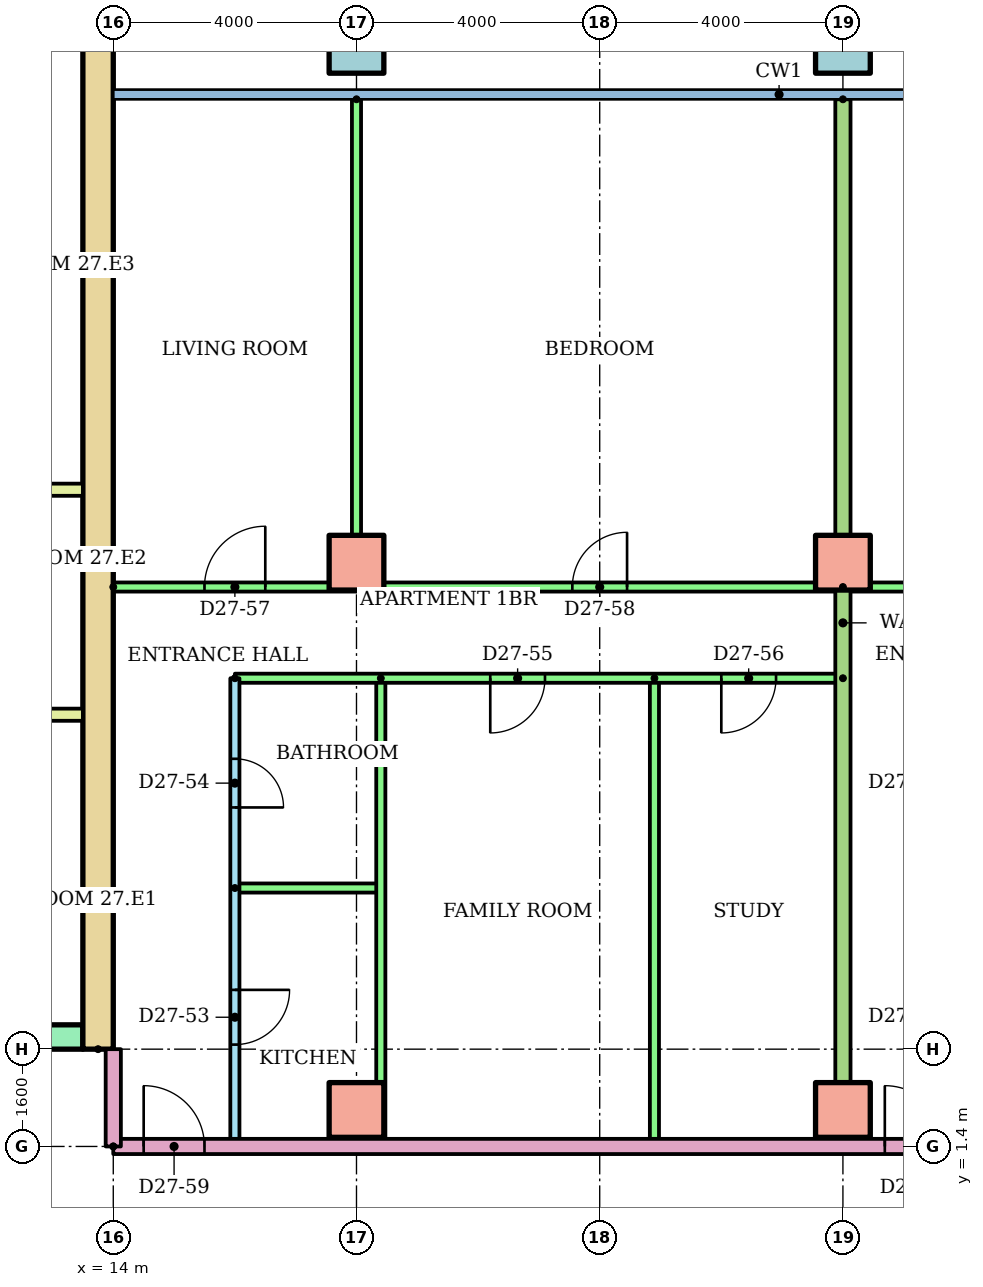
"""IFC4 building model, lengths in metres.
Left out: names, types, materials, properties, quantities, classifications, styles, units other than length and angle.
Written with IfcOpenShell. Run it as: python <this file> out.ifc"""

import sys

from ifc_helpers import new_model, si_unit, direction, frame, frame_2d, origin, origin_2d, place, context, subcontext, project, spatial, rectangle, hollow_rectangle, extrude, element, fill, save


model = new_model("IFC4")
c1 = context("Model", 3, precision=1e-05, world=origin(), true_north=direction((0.0, 1.0)))
c2 = subcontext(c1, "Body", "Model", "MODEL_VIEW")
j1 = project(units=[si_unit("LENGTHUNIT", "METRE"), si_unit("PLANEANGLEUNIT", "RADIAN")], contexts=[c1])
p1 = place(None, origin())
s1 = spatial("IfcSite", under=j1, at=p1, CompositionType="ELEMENT")
p2 = place(p1, origin())
s2 = spatial("IfcBuilding", under=s1, at=p2, CompositionType="ELEMENT")
p3 = place(p2, frame((0.0, 0.0, 103.1)))
s3 = spatial("IfcBuildingStorey", under=s2, at=p3, CompositionType="ELEMENT", Elevation=103.1)
for number, where in (
    (1, (18.0, 2.0, 0.0)),
    (2, (26.0, 2.0, 0.0)),
    (3, (18.0, 11.0, 0.0)),
    (4, (26.0, 11.0, 0.0)),
):
    element("IfcColumn", number, at=place(p3, frame(where)), inside=s3, PredefinedType="COLUMN", context=c2, shape_type="SweptSolid", body=[
        extrude(rectangle(XDim=0.9, YDim=0.9, at=origin_2d()), origin(), (0.0, 0.0, 1.0), 3.2),
    ])
for number, where in (
    (5, (18.0, 19.5, 0.0)),
    (6, (26.0, 19.5, 0.0)),
):
    element("IfcColumn", number, at=place(p3, frame(where)), inside=s3, PredefinedType="COLUMN", context=c2, shape_type="SweptSolid", body=[
        extrude(hollow_rectangle(XDim=0.9, YDim=0.9, WallThickness=0.045, at=origin_2d()), origin(), (0.0, 0.0, 1.0), 3.2),
    ])
p4 = place(p3, frame((13.75, 3.0, 0.0), z_axis=(0.0, 0.0, 1.0), x_axis=(0.0, 1.0, 0.0)))
e7 = element("IfcWall", 7, at=p4, inside=s3, PredefinedType="SHEAR", context=c2, shape_type="SweptSolid", body=[
    extrude(rectangle(XDim=17.0, YDim=0.5, at=frame_2d((8.5, 0.0))), origin(), (0.0, 0.0, 1.0), 2.8),
])
p5 = place(p3, frame((-13.5, 3.2, 0.0)))
e8 = element("IfcWall", 8, at=p5, inside=s3, PredefinedType="SHEAR", context=c2, shape_type="SweptSolid", body=[
    extrude(rectangle(XDim=27.0, YDim=0.4, at=frame_2d((13.5, 0.0))), origin(), (0.0, 0.0, 1.0), 2.8),
])
p6 = place(p5, frame((6.861, 0.0, 0.0)))
e9 = element("IfcOpeningElement", 9, at=p6, cuts=e8, PredefinedType="OPENING", context=c2, shape_type="SweptSolid", body=[
    extrude(rectangle(XDim=1.1, YDim=2.1, at=frame_2d((0.55, 1.05))), frame((0.0, 0.21, 0.0), z_axis=(0.0, -1.0, 0.0), x_axis=(1.0, 0.0, 0.0)), (0.0, 0.0, 1.0), 0.42),
])
p7 = place(p5, frame((9.906, 0.0, 0.0)))
e10 = element("IfcOpeningElement", 10, at=p7, cuts=e8, PredefinedType="OPENING", context=c2, shape_type="SweptSolid", body=[
    extrude(rectangle(XDim=1.1, YDim=2.1, at=frame_2d((0.55, 1.05))), frame((0.0, 0.21, 0.0), z_axis=(0.0, -1.0, 0.0), x_axis=(1.0, 0.0, 0.0)), (0.0, 0.0, 1.0), 0.42),
])
p8 = place(p5, frame((15.994, 0.0, 0.0)))
e11 = element("IfcOpeningElement", 11, at=p8, cuts=e8, PredefinedType="OPENING", context=c2, shape_type="SweptSolid", body=[
    extrude(rectangle(XDim=1.1, YDim=2.1, at=frame_2d((0.55, 1.05))), frame((0.0, 0.21, 0.0), z_axis=(0.0, -1.0, 0.0), x_axis=(1.0, 0.0, 0.0)), (0.0, 0.0, 1.0), 0.42),
])
p9 = place(p5, frame((19.039, 0.0, 0.0)))
e12 = element("IfcOpeningElement", 12, at=p9, cuts=e8, PredefinedType="OPENING", context=c2, shape_type="SweptSolid", body=[
    extrude(rectangle(XDim=1.1, YDim=2.1, at=frame_2d((0.55, 1.05))), frame((0.0, 0.21, 0.0), z_axis=(0.0, -1.0, 0.0), x_axis=(1.0, 0.0, 0.0)), (0.0, 0.0, 1.0), 0.42),
])
p10 = place(p5, frame((12.6, 0.0, 0.0)))
e13 = element("IfcOpeningElement", 13, at=p10, cuts=e8, PredefinedType="OPENING", context=c2, shape_type="SweptSolid", body=[
    extrude(rectangle(XDim=1.8, YDim=2.1, at=frame_2d((0.9, 1.05))), frame((0.0, 0.21, 0.0), z_axis=(0.0, -1.0, 0.0), x_axis=(1.0, 0.0, 0.0)), (0.0, 0.0, 1.0), 0.42),
])
for number, where in (
    (14, (9.6, 8.5, 0.0)),
    (15, (9.6, 12.2, 0.0)),
):
    element("IfcWall", number, at=place(p3, frame(where)), inside=s3, PredefinedType="PARTITIONING", context=c2, shape_type="SweptSolid", body=[
        extrude(rectangle(XDim=3.9, YDim=0.2, at=frame_2d((1.95, 0.0))), origin(), (0.0, 0.0, 1.0), 2.8),
    ])
p11 = place(p3, frame((16.0, 9.1, 0.0), z_axis=(0.0, 0.0, 1.0), x_axis=(0.0, -1.0, 0.0)))
e16 = element("IfcWall", 16, at=p11, inside=s3, PredefinedType="PARTITIONING", context=c2, shape_type="SweptSolid", body=[
    extrude(rectangle(XDim=7.7, YDim=0.15, at=frame_2d((3.85, 0.0))), origin(), (0.0, 0.0, 1.0), 2.4),
])
p12 = place(p11, frame((5.125, 0.0, 0.0)))
e17 = element("IfcOpeningElement", 17, at=p12, cuts=e16, PredefinedType="OPENING", context=c2, shape_type="SweptSolid", body=[
    extrude(rectangle(XDim=0.9, YDim=2.1, at=frame_2d((0.45, 1.05))), frame((0.0, 0.085, 0.0), z_axis=(0.0, -1.0, 0.0), x_axis=(1.0, 0.0, 0.0)), (0.0, 0.0, 1.0), 0.17),
])
p13 = place(p11, frame((1.325, 0.0, 0.0)))
e18 = element("IfcOpeningElement", 18, at=p13, cuts=e16, PredefinedType="OPENING", context=c2, shape_type="SweptSolid", body=[
    extrude(rectangle(XDim=0.8, YDim=2.1, at=frame_2d((0.4, 1.05))), frame((0.0, 0.085, 0.0), z_axis=(0.0, -1.0, 0.0), x_axis=(1.0, 0.0, 0.0)), (0.0, 0.0, 1.0), 0.17),
])
p14 = place(p3, frame((16.0, 5.65, 0.0)))
e19 = element("IfcWall", 19, at=p14, inside=s3, PredefinedType="PARTITIONING", context=c2, shape_type="SweptSolid", body=[
    extrude(rectangle(XDim=2.4, YDim=0.15, at=frame_2d((1.2, 0.0))), origin(), (0.0, 0.0, 1.0), 2.4),
])
for number, where, z_axis, x_axis in (
    (20, (18.4, 9.1, 0.0), (0.0, 0.0, 1.0), (0.0, -1.0, 0.0)),
    (21, (22.9, 9.1, 0.0), (0.0, 0.0, 1.0), (0.0, -1.0, 0.0)),
):
    element("IfcWall", number, at=place(p3, frame(where, z_axis=z_axis, x_axis=x_axis)), inside=s3, PredefinedType="PARTITIONING", context=c2, shape_type="SweptSolid", body=[
        extrude(rectangle(XDim=7.7, YDim=0.15, at=frame_2d((3.85, 0.0))), origin(), (0.0, 0.0, 1.0), 2.4),
    ])
p15 = place(p3, frame((26.0, 9.1, 0.0), z_axis=(0.0, 0.0, 1.0), x_axis=(-1.0, 0.0, 0.0)))
e22 = element("IfcWall", 22, at=p15, inside=s3, PredefinedType="PARTITIONING", context=c2, shape_type="SweptSolid", body=[
    extrude(rectangle(XDim=10.0, YDim=0.15, at=frame_2d((5.0, 0.0))), origin(), (0.0, 0.0, 1.0), 2.4),
])
p16 = place(p15, frame((4.9, 0.0, 0.0)))
e23 = element("IfcOpeningElement", 23, at=p16, cuts=e22, PredefinedType="OPENING", context=c2, shape_type="SweptSolid", body=[
    extrude(rectangle(XDim=0.9, YDim=2.1, at=frame_2d((0.45, 1.05))), frame((0.0, 0.085, 0.0), z_axis=(0.0, -1.0, 0.0), x_axis=(1.0, 0.0, 0.0)), (0.0, 0.0, 1.0), 0.17),
])
p17 = place(p15, frame((1.1, 0.0, 0.0)))
e24 = element("IfcOpeningElement", 24, at=p17, cuts=e22, PredefinedType="OPENING", context=c2, shape_type="SweptSolid", body=[
    extrude(rectangle(XDim=0.9, YDim=2.1, at=frame_2d((0.45, 1.05))), frame((0.0, 0.085, 0.0), z_axis=(0.0, -1.0, 0.0), x_axis=(1.0, 0.0, 0.0)), (0.0, 0.0, 1.0), 0.17),
])
p18 = place(p3, frame((14.0, 10.6, 0.0)))
e25 = element("IfcWall", 25, at=p18, inside=s3, PredefinedType="PARTITIONING", context=c2, shape_type="SweptSolid", body=[
    extrude(rectangle(XDim=12.0, YDim=0.15, at=frame_2d((6.0, 0.0))), origin(), (0.0, 0.0, 1.0), 2.4),
])
p19 = place(p18, frame((1.5, 0.0, 0.0)))
e26 = element("IfcOpeningElement", 26, at=p19, cuts=e25, PredefinedType="OPENING", context=c2, shape_type="SweptSolid", body=[
    extrude(rectangle(XDim=1.0, YDim=2.1, at=frame_2d((0.5, 1.05))), frame((0.0, 0.085, 0.0), z_axis=(0.0, -1.0, 0.0), x_axis=(1.0, 0.0, 0.0)), (0.0, 0.0, 1.0), 0.17),
])
p20 = place(p18, frame((7.55, 0.0, 0.0)))
e27 = element("IfcOpeningElement", 27, at=p20, cuts=e25, PredefinedType="OPENING", context=c2, shape_type="SweptSolid", body=[
    extrude(rectangle(XDim=0.9, YDim=2.1, at=frame_2d((0.45, 1.05))), frame((0.0, 0.085, 0.0), z_axis=(0.0, -1.0, 0.0), x_axis=(1.0, 0.0, 0.0)), (0.0, 0.0, 1.0), 0.17),
])
p21 = place(p3, frame((18.0, 18.621, 0.0), z_axis=(0.0, 0.0, 1.0), x_axis=(0.0, -1.0, 0.0)))
e28 = element("IfcWall", 28, at=p21, inside=s3, PredefinedType="PARTITIONING", context=c2, shape_type="SweptSolid", body=[
    extrude(rectangle(XDim=8.021, YDim=0.15, at=frame_2d((4.01, 0.0))), origin(), (0.0, 0.0, 1.0), 2.4),
])
p22 = place(p3, frame((26.0, 10.6, 0.0)))
e29 = element("IfcWall", 29, at=p22, inside=s3, PredefinedType="PARTITIONING", context=c2, shape_type="SweptSolid", body=[
    extrude(rectangle(XDim=14.61, YDim=0.15, at=frame_2d((7.305, 0.0))), origin(), (0.0, 0.0, 1.0), 2.4),
])
p23 = place(p22, frame((3.5, 0.0, 0.0)))
e30 = element("IfcOpeningElement", 30, at=p23, cuts=e29, PredefinedType="OPENING", context=c2, shape_type="SweptSolid", body=[
    extrude(rectangle(XDim=1.0, YDim=2.1, at=frame_2d((0.5, 1.05))), frame((0.0, 0.085, 0.0), z_axis=(0.0, -1.0, 0.0), x_axis=(1.0, 0.0, 0.0)), (0.0, 0.0, 1.0), 0.17),
])
p24 = place(p22, frame((10.75, 0.0, 0.0)))
e31 = element("IfcOpeningElement", 31, at=p24, cuts=e29, PredefinedType="OPENING", context=c2, shape_type="SweptSolid", body=[
    extrude(rectangle(XDim=0.9, YDim=2.1, at=frame_2d((0.45, 1.05))), frame((0.0, 0.085, 0.0), z_axis=(0.0, -1.0, 0.0), x_axis=(1.0, 0.0, 0.0)), (0.0, 0.0, 1.0), 0.17),
])
p25 = place(p3, frame((26.0, 18.621, 0.0), z_axis=(0.0, 0.0, 1.0), x_axis=(0.0, -1.0, 0.0)))
e32 = element("IfcWall", 32, at=p25, inside=s3, PredefinedType="PARTITIONING", context=c2, shape_type="SweptSolid", body=[
    extrude(rectangle(XDim=17.221, YDim=0.25, at=frame_2d((8.611, 0.0))), origin(), (0.0, 0.0, 1.0), 2.4),
])
p26 = place(p3, frame((14.0, 1.4, 0.0)))
e33 = element("IfcWall", 33, at=p26, inside=s3, PredefinedType="PARTITIONING", context=c2, shape_type="SweptSolid", body=[
    extrude(rectangle(XDim=15.0, YDim=0.25, at=frame_2d((7.5, 0.0))), origin(), (0.0, 0.0, 1.0), 2.4),
])
p27 = place(p26, frame((0.5, 0.0, 0.0)))
e34 = element("IfcOpeningElement", 34, at=p27, cuts=e33, PredefinedType="OPENING", context=c2, shape_type="SweptSolid", body=[
    extrude(rectangle(XDim=1.0, YDim=2.1, at=frame_2d((0.5, 1.05))), frame((0.0, 0.135, 0.0), z_axis=(0.0, -1.0, 0.0), x_axis=(1.0, 0.0, 0.0)), (0.0, 0.0, 1.0), 0.27),
])
p28 = place(p26, frame((12.689, 0.0, 0.0)))
e35 = element("IfcOpeningElement", 35, at=p28, cuts=e33, PredefinedType="OPENING", context=c2, shape_type="SweptSolid", body=[
    extrude(rectangle(XDim=1.0, YDim=2.1, at=frame_2d((0.5, 1.05))), frame((0.0, 0.135, 0.0), z_axis=(0.0, -1.0, 0.0), x_axis=(1.0, 0.0, 0.0)), (0.0, 0.0, 1.0), 0.27),
])
p29 = place(p3, frame((14.0, 1.4, 0.0), z_axis=(0.0, 0.0, 1.0), x_axis=(0.0, 1.0, 0.0)))
e36 = element("IfcWall", 36, at=p29, inside=s3, PredefinedType="PARTITIONING", context=c2, shape_type="SweptSolid", body=[
    extrude(rectangle(XDim=1.6, YDim=0.25, at=frame_2d((0.8, 0.0))), origin(), (0.0, 0.0, 1.0), 2.4),
])
p30 = place(p12, origin())
e37 = element("IfcDoor", 37, at=p30, inside=s3, OperationType="SINGLE_SWING_LEFT", PredefinedType="DOOR", context=c2, shape_type="SweptSolid", body=[
    extrude(rectangle(XDim=0.9, YDim=2.1, at=frame_2d((0.45, 1.05))), frame((0.0, 0.025, 0.0), z_axis=(0.0, -1.0, 0.0), x_axis=(1.0, 0.0, 0.0)), (0.0, 0.0, 1.0), 0.05),
])
fill(e17, e37)
p31 = place(p13, origin())
e38 = element("IfcDoor", 38, at=p31, inside=s3, OperationType="SINGLE_SWING_RIGHT", PredefinedType="DOOR", context=c2, shape_type="SweptSolid", body=[
    extrude(rectangle(XDim=0.8, YDim=2.1, at=frame_2d((0.4, 1.05))), frame((0.0, 0.025, 0.0), z_axis=(0.0, -1.0, 0.0), x_axis=(1.0, 0.0, 0.0)), (0.0, 0.0, 1.0), 0.05),
])
fill(e18, e38)
p32 = place(p16, origin())
e39 = element("IfcDoor", 39, at=p32, inside=s3, OperationType="SINGLE_SWING_RIGHT", PredefinedType="DOOR", context=c2, shape_type="SweptSolid", body=[
    extrude(rectangle(XDim=0.9, YDim=2.1, at=frame_2d((0.45, 1.05))), frame((0.0, 0.025, 0.0), z_axis=(0.0, -1.0, 0.0), x_axis=(1.0, 0.0, 0.0)), (0.0, 0.0, 1.0), 0.05),
])
fill(e23, e39)
p33 = place(p17, origin())
e40 = element("IfcDoor", 40, at=p33, inside=s3, OperationType="SINGLE_SWING_RIGHT", PredefinedType="DOOR", context=c2, shape_type="SweptSolid", body=[
    extrude(rectangle(XDim=0.9, YDim=2.1, at=frame_2d((0.45, 1.05))), frame((0.0, 0.025, 0.0), z_axis=(0.0, -1.0, 0.0), x_axis=(1.0, 0.0, 0.0)), (0.0, 0.0, 1.0), 0.05),
])
fill(e24, e40)
p34 = place(p19, origin())
e41 = element("IfcDoor", 41, at=p34, inside=s3, OperationType="SINGLE_SWING_RIGHT", PredefinedType="DOOR", context=c2, shape_type="SweptSolid", body=[
    extrude(rectangle(XDim=1.0, YDim=2.1, at=frame_2d((0.5, 1.05))), frame((0.0, 0.025, 0.0), z_axis=(0.0, -1.0, 0.0), x_axis=(1.0, 0.0, 0.0)), (0.0, 0.0, 1.0), 0.05),
])
fill(e26, e41)
p35 = place(p20, origin())
e42 = element("IfcDoor", 42, at=p35, inside=s3, OperationType="SINGLE_SWING_RIGHT", PredefinedType="DOOR", context=c2, shape_type="SweptSolid", body=[
    extrude(rectangle(XDim=0.9, YDim=2.1, at=frame_2d((0.45, 1.05))), frame((0.0, 0.025, 0.0), z_axis=(0.0, -1.0, 0.0), x_axis=(1.0, 0.0, 0.0)), (0.0, 0.0, 1.0), 0.05),
])
fill(e27, e42)
p36 = place(p27, origin())
e43 = element("IfcDoor", 43, at=p36, inside=s3, OperationType="SINGLE_SWING_LEFT", PredefinedType="DOOR", context=c2, shape_type="SweptSolid", body=[
    extrude(rectangle(XDim=1.0, YDim=2.1, at=frame_2d((0.5, 1.05))), frame((0.0, 0.025, 0.0), z_axis=(0.0, -1.0, 0.0), x_axis=(1.0, 0.0, 0.0)), (0.0, 0.0, 1.0), 0.05),
])
fill(e34, e43)
p37 = place(p28, origin())
e44 = element("IfcDoor", 44, at=p37, inside=s3, OperationType="SINGLE_SWING_LEFT", PredefinedType="DOOR", context=c2, shape_type="SweptSolid", body=[
    extrude(rectangle(XDim=1.0, YDim=2.1, at=frame_2d((0.5, 1.05))), frame((0.0, 0.025, 0.0), z_axis=(0.0, -1.0, 0.0), x_axis=(1.0, 0.0, 0.0)), (0.0, 0.0, 1.0), 0.05),
])
fill(e35, e44)
save(model, sys.argv[1])
